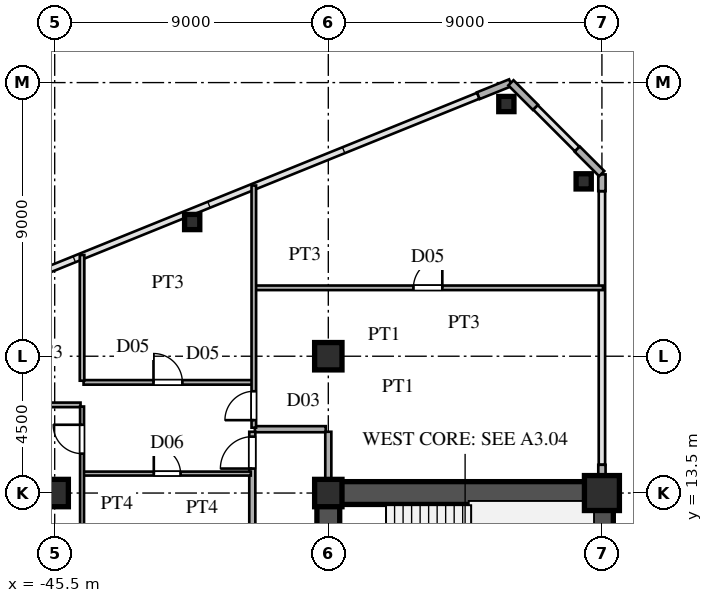
"""IFC4 building model, lengths in metres.
Left out: names, types, materials, properties, quantities, classifications, styles, units other than length and angle.
Written with IfcOpenShell. Run it as: python <this file> out.ifc"""

import sys

from ifc_helpers import new_model, si_unit, direction, frame, frame_2d, origin, origin_2d, place, context, subcontext, project, spatial, rectangle, hollow_rectangle, i_section, extrude, source, transform, mapped, element, fill, save


model = new_model("IFC4")
c1 = context("Model", 3, precision=1e-05, world=origin(), true_north=direction((0.0, 1.0)))
c2 = subcontext(c1, "Body", "Model", "MODEL_VIEW")
j1 = project(units=[si_unit("LENGTHUNIT", "METRE"), si_unit("PLANEANGLEUNIT", "RADIAN")], contexts=[c1])
p1 = place(None, origin())
s1 = spatial("IfcSite", under=j1, at=p1, CompositionType="ELEMENT")
p2 = place(p1, origin())
s2 = spatial("IfcBuilding", under=s1, at=p2, CompositionType="ELEMENT")
p3 = place(p2, frame((0.0, 0.0, 40.5)))
s3 = spatial("IfcBuildingStorey", under=s2, at=p3, CompositionType="ELEMENT", Elevation=40.5)
m1 = source(origin(), c2, "Body", "SweptSolid", [
    extrude(hollow_rectangle(XDim=1.15, YDim=1.15, WallThickness=0.048, at=origin_2d()), origin(), (0.0, 0.0, 1.0), 3.6),
])
p4 = place(p3, frame((-27.5, 13.5, 0.0), z_axis=(0.0, 0.0, 1.0), x_axis=(1.0, 0.0, 0.0)))
e1 = element("IfcColumn", 1, at=p4, inside=s3, PredefinedType="COLUMN", context=c2, shape_type="MappedRepresentation", body=[
    mapped(m1, transform((0.0, 0.0, 0.0), scale=1.0)),
])
m2 = source(origin(), c2, "Body", "SweptSolid", [
    extrude(i_section(OverallWidth=0.9, OverallDepth=0.9, WebThickness=0.036, FlangeThickness=0.055, at=origin_2d()), origin(), (0.0, 0.0, 1.0), 3.6),
])
for number, where, z_axis, x_axis in (
    (2, (-36.5, 13.5, 0.0), (0.0, 0.0, 1.0), (1.0, 0.0, 0.0)),
    (3, (-36.5, 18.0, 0.0), (0.0, 0.0, 1.0), (1.0, 0.0, 0.0)),
    (4, (-45.5, 13.5, 0.0), (0.0, 0.0, 1.0), (1.0, 0.0, 0.0)),
):
    element("IfcColumn", number, at=place(p3, frame(where, z_axis=z_axis, x_axis=x_axis)), inside=s3, PredefinedType="COLUMN", context=c2, shape_type="MappedRepresentation", body=[
        mapped(m2, transform((0.0, 0.0, 0.0), scale=1.0)),
    ])
m3 = source(origin(), c2, "Body", "SweptSolid", [
    extrude(hollow_rectangle(XDim=0.5, YDim=0.5, WallThickness=0.02, at=origin_2d()), origin(), (0.0, 0.0, 1.0), 3.6),
])
for number, where, z_axis, x_axis in (
    (5, (-28.1, 23.751, 0.0), (0.0, 0.0, 1.0), (1.0, 0.0, 0.0)),
    (6, (-30.643, 26.295, 0.0), (0.0, 0.0, 1.0), (1.0, 0.0, 0.0)),
    (7, (-40.977, 22.414, 0.0), (0.0, 0.0, 1.0), (1.0, 0.0, 0.0)),
):
    element("IfcColumn", number, at=place(p3, frame(where, z_axis=z_axis, x_axis=x_axis)), inside=s3, PredefinedType="COLUMN", context=c2, shape_type="MappedRepresentation", body=[
        mapped(m3, transform((0.0, 0.0, 0.0), scale=1.0)),
    ])
p5 = place(p3, frame((-27.5, 13.88, 0.0), z_axis=(0.0, 0.0, 1.0), x_axis=(0.0, 1.0, 0.0)))
e8 = element("IfcWall", 8, at=p5, inside=s3, PredefinedType="SOLIDWALL", context=c2, shape_type="SweptSolid", body=[
    extrude(rectangle(XDim=0.55, YDim=0.24, at=frame_2d((0.275, 0.0))), origin(), (0.0, 0.0, 1.0), 2.88),
])
p6 = place(p3, frame((-27.5, 23.43, 0.0), z_axis=(0.0, 0.0, 1.0), x_axis=(0.0, 1.0, 0.0)))
e9 = element("IfcWall", 9, at=p6, inside=s3, PredefinedType="SOLIDWALL", context=c2, shape_type="SweptSolid", body=[
    extrude(rectangle(XDim=0.55, YDim=0.24, at=frame_2d((0.275, 0.0))), origin(), (0.0, 0.0, 1.0), 3.38),
])
for number, where, z_axis, x_axis in (
    (10, (-27.507, 24.007, 0.0), (0.0, 0.0, 1.0), (-0.707, 0.707, 0.0)),
    (11, (-29.687, 26.187, 0.0), (0.0, 0.0, 1.0), (-0.707, 0.707, 0.0)),
):
    element("IfcWall", number, at=place(p3, frame(where, z_axis=z_axis, x_axis=x_axis)), inside=s3, PredefinedType="SOLIDWALL", context=c2, shape_type="SweptSolid", body=[
        extrude(rectangle(XDim=1.14, YDim=0.24, at=frame_2d((0.57, 0.0))), origin(), (0.0, 0.0, 1.0), 3.38),
    ])
p7 = place(p3, frame((-30.509, 26.996, 0.0), z_axis=(0.0, 0.0, 1.0), x_axis=(-0.927007103665, -0.375043770452, 0.0)))
e12 = element("IfcWall", 12, at=p7, inside=s3, PredefinedType="SOLIDWALL", context=c2, shape_type="SweptSolid", body=[
    extrude(rectangle(XDim=1.14, YDim=0.24, at=frame_2d((0.57, 0.0))), origin(), (0.0, 0.0, 1.0), 3.38),
])
p8 = place(p3, frame((-27.5, 1.3, 0.0), z_axis=(0.0, 0.0, 1.0), x_axis=(0.0, 1.0, 0.0)))
e13 = element("IfcWall", 13, at=p8, inside=s3, PredefinedType="SHEAR", context=c2, shape_type="SweptSolid", body=[
    extrude(rectangle(XDim=12.2, YDim=0.75, at=frame_2d((6.1, 0.0))), origin(), (0.0, 0.0, 1.0), 3.38),
])
p9 = place(p3, frame((-36.5, 13.5, 0.0), z_axis=(0.0, 0.0, 1.0), x_axis=(1.0, 0.0, 0.0)))
e14 = element("IfcWall", 14, at=p9, inside=s3, PredefinedType="SHEAR", context=c2, shape_type="SweptSolid", body=[
    extrude(rectangle(XDim=9.0, YDim=0.75, at=frame_2d((4.5, 0.0))), origin(), (0.0, 0.0, 1.0), 3.38),
])
p10 = place(p3, frame((-36.5, 8.2, 0.0), z_axis=(0.0, 0.0, 1.0), x_axis=(0.0, 1.0, 0.0)))
e15 = element("IfcWall", 15, at=p10, inside=s3, PredefinedType="SHEAR", context=c2, shape_type="SweptSolid", body=[
    extrude(rectangle(XDim=5.45, YDim=0.75, at=frame_2d((2.725, 0.0))), origin(), (0.0, 0.0, 1.0), 3.38),
])
p11 = place(p10, frame((0.245, 0.0, 0.0)))
e16 = element("IfcOpeningElement", 16, at=p11, cuts=e15, PredefinedType="OPENING", context=c2, shape_type="SweptSolid", body=[
    extrude(rectangle(XDim=0.95, YDim=2.15, at=frame_2d((0.475, 1.075))), frame((0.0, 0.385, 0.0), z_axis=(0.0, -1.0, 0.0), x_axis=(1.0, 0.0, 0.0)), (0.0, 0.0, 1.0), 0.77),
])
p12 = place(p3, frame((-44.55, 14.14, 0.0), z_axis=(0.0, 0.0, 1.0), x_axis=(1.0, 0.0, 0.0)))
e17 = element("IfcWall", 17, at=p12, inside=s3, PredefinedType="PARTITIONING", context=c2, shape_type="SweptSolid", body=[
    extrude(rectangle(XDim=5.5, YDim=0.13, at=frame_2d((2.75, 0.0))), origin(), (0.0, 0.0, 1.0), 3.38),
])
p13 = place(p12, frame((2.31, 0.0, 0.0)))
e18 = element("IfcOpeningElement", 18, at=p13, cuts=e17, PredefinedType="OPENING", context=c2, shape_type="SweptSolid", body=[
    extrude(rectangle(XDim=0.88, YDim=2.1, at=frame_2d((0.44, 1.05))), frame((0.0, 0.075, 0.0), z_axis=(0.0, -1.0, 0.0), x_axis=(1.0, 0.0, 0.0)), (0.0, 0.0, 1.0), 0.15),
])
p14 = place(p3, frame((-38.915, 15.6, 0.0), z_axis=(0.0, 0.0, 1.0), x_axis=(1.0, 0.0, 0.0)))
e19 = element("IfcWall", 19, at=p14, inside=s3, PredefinedType="PARTITIONING", context=c2, shape_type="SweptSolid", body=[
    extrude(rectangle(XDim=2.33, YDim=0.2, at=frame_2d((1.165, 0.0))), origin(), (0.0, 0.0, 1.0), 3.38),
])
p15 = place(p3, frame((-54.45, 16.4, 0.0), z_axis=(0.0, 0.0, 1.0), x_axis=(1.0, 0.0, 0.0)))
e20 = element("IfcWall", 20, at=p15, inside=s3, PredefinedType="PARTITIONING", context=c2, shape_type="SweptSolid", body=[
    extrude(rectangle(XDim=9.8, YDim=0.15, at=frame_2d((4.9, 0.0))), origin(), (0.0, 0.0, 1.0), 3.38),
])
p16 = place(p15, frame((4.425, 0.0, 0.0)))
e21 = element("IfcOpeningElement", 21, at=p16, cuts=e20, PredefinedType="OPENING", context=c2, shape_type="SweptSolid", body=[
    extrude(rectangle(XDim=0.95, YDim=2.15, at=frame_2d((0.475, 1.075))), frame((0.0, 0.085, 0.0), z_axis=(0.0, -1.0, 0.0), x_axis=(1.0, 0.0, 0.0)), (0.0, 0.0, 1.0), 0.17),
])
p17 = place(p3, frame((-44.55, 17.14, 0.0), z_axis=(0.0, 0.0, 1.0), x_axis=(1.0, 0.0, 0.0)))
e22 = element("IfcWall", 22, at=p17, inside=s3, PredefinedType="PARTITIONING", context=c2, shape_type="SweptSolid", body=[
    extrude(rectangle(XDim=5.55, YDim=0.15, at=frame_2d((2.775, 0.0))), origin(), (0.0, 0.0, 1.0), 3.38),
])
p18 = place(p17, frame((2.3, 0.0, 0.0)))
e23 = element("IfcOpeningElement", 23, at=p18, cuts=e22, PredefinedType="OPENING", context=c2, shape_type="SweptSolid", body=[
    extrude(rectangle(XDim=0.95, YDim=2.15, at=frame_2d((0.475, 1.075))), frame((0.0, 0.085, 0.0), z_axis=(0.0, -1.0, 0.0), x_axis=(1.0, 0.0, 0.0)), (0.0, 0.0, 1.0), 0.17),
])
p19 = place(p3, frame((-38.9, 20.25, 0.0), z_axis=(0.0, 0.0, 1.0), x_axis=(1.0, 0.0, 0.0)))
e24 = element("IfcWall", 24, at=p19, inside=s3, PredefinedType="PARTITIONING", context=c2, shape_type="SweptSolid", body=[
    extrude(rectangle(XDim=11.435, YDim=0.15, at=frame_2d((5.717, 0.0))), origin(), (0.0, 0.0, 1.0), 3.38),
])
p20 = place(p19, frame((5.2, 0.0, 0.0)))
e25 = element("IfcOpeningElement", 25, at=p20, cuts=e24, PredefinedType="OPENING", context=c2, shape_type="SweptSolid", body=[
    extrude(rectangle(XDim=0.95, YDim=2.15, at=frame_2d((0.475, 1.075))), frame((0.0, 0.085, 0.0), z_axis=(0.0, -1.0, 0.0), x_axis=(1.0, 0.0, 0.0)), (0.0, 0.0, 1.0), 0.17),
])
p21 = place(p3, frame((-44.6, 7.652, 0.0), z_axis=(0.0, 0.0, 1.0), x_axis=(0.0, 1.0, 0.0)))
e26 = element("IfcWall", 26, at=p21, inside=s3, PredefinedType="PARTITIONING", context=c2, shape_type="SweptSolid", body=[
    extrude(rectangle(XDim=8.694, YDim=0.13, at=frame_2d((4.347, 0.0))), origin(), (0.0, 0.0, 1.0), 3.38),
])
p22 = place(p21, frame((7.144, 0.0, 0.0)))
e27 = element("IfcOpeningElement", 27, at=p22, cuts=e26, PredefinedType="OPENING", context=c2, shape_type="SweptSolid", body=[
    extrude(rectangle(XDim=0.95, YDim=2.15, at=frame_2d((0.475, 1.075))), frame((0.0, 0.075, 0.0), z_axis=(0.0, -1.0, 0.0), x_axis=(1.0, 0.0, 0.0)), (0.0, 0.0, 1.0), 0.15),
])
p23 = place(p3, frame((-44.6, 17.195, 0.0), z_axis=(0.0, 0.0, 1.0), x_axis=(0.0, 1.0, 0.0)))
e28 = element("IfcWall", 28, at=p23, inside=s3, PredefinedType="PARTITIONING", context=c2, shape_type="SweptSolid", body=[
    extrude(rectangle(XDim=4.133, YDim=0.15, at=frame_2d((2.066, 0.0))), origin(), (0.0, 0.0, 1.0), 3.38),
])
p24 = place(p3, frame((-39.0, -15.515, 0.0), z_axis=(0.0, 0.0, 1.0), x_axis=(0.0, 1.0, 0.0)))
e29 = element("IfcWall", 29, at=p24, inside=s3, PredefinedType="PARTITIONING", context=c2, shape_type="SweptSolid", body=[
    extrude(rectangle(XDim=31.03, YDim=0.2, at=frame_2d((15.515, 0.0))), origin(), (0.0, 0.0, 1.0), 3.38),
])
p25 = place(p24, frame((0.367, 0.0, 0.0)))
e30 = element("IfcOpeningElement", 30, at=p25, cuts=e29, PredefinedType="OPENING", context=c2, shape_type="SweptSolid", body=[
    extrude(rectangle(XDim=1.05, YDim=2.25, at=frame_2d((0.525, 1.125))), frame((0.0, 0.11, 0.0), z_axis=(0.0, -1.0, 0.0), x_axis=(1.0, 0.0, 0.0)), (0.0, 0.0, 1.0), 0.22),
])
p26 = place(p24, frame((8.638, 0.0, 0.0)))
e31 = element("IfcOpeningElement", 31, at=p26, cuts=e29, PredefinedType="OPENING", context=c2, shape_type="SweptSolid", body=[
    extrude(rectangle(XDim=1.05, YDim=2.25, at=frame_2d((0.525, 1.125))), frame((0.0, 0.11, 0.0), z_axis=(0.0, -1.0, 0.0), x_axis=(1.0, 0.0, 0.0)), (0.0, 0.0, 1.0), 0.22),
])
p27 = place(p24, frame((19.795, 0.0, 0.0)))
e32 = element("IfcOpeningElement", 32, at=p27, cuts=e29, PredefinedType="OPENING", context=c2, shape_type="SweptSolid", body=[
    extrude(rectangle(XDim=1.05, YDim=2.25, at=frame_2d((0.525, 1.125))), frame((0.0, 0.11, 0.0), z_axis=(0.0, -1.0, 0.0), x_axis=(1.0, 0.0, 0.0)), (0.0, 0.0, 1.0), 0.22),
])
p28 = place(p24, frame((29.82, 0.0, 0.0)))
e33 = element("IfcOpeningElement", 33, at=p28, cuts=e29, PredefinedType="OPENING", context=c2, shape_type="SweptSolid", body=[
    extrude(rectangle(XDim=1.05, YDim=2.25, at=frame_2d((0.525, 1.125))), frame((0.0, 0.11, 0.0), z_axis=(0.0, -1.0, 0.0), x_axis=(1.0, 0.0, 0.0)), (0.0, 0.0, 1.0), 0.22),
])
p29 = place(p3, frame((-38.95, 15.65, 0.0), z_axis=(0.0, 0.0, 1.0), x_axis=(0.0, 1.0, 0.0)))
e34 = element("IfcWall", 34, at=p29, inside=s3, PredefinedType="PARTITIONING", context=c2, shape_type="SweptSolid", body=[
    extrude(rectangle(XDim=7.965, YDim=0.15, at=frame_2d((3.982, 0.0))), origin(), (0.0, 0.0, 1.0), 3.38),
])
p30 = place(p29, frame((0.248, 0.0, 0.0)))
e35 = element("IfcOpeningElement", 35, at=p30, cuts=e34, PredefinedType="OPENING", context=c2, shape_type="SweptSolid", body=[
    extrude(rectangle(XDim=0.95, YDim=2.15, at=frame_2d((0.475, 1.075))), frame((0.0, 0.085, 0.0), z_axis=(0.0, -1.0, 0.0), x_axis=(1.0, 0.0, 0.0)), (0.0, 0.0, 1.0), 0.17),
])
p31 = place(p3, frame((-36.5, 13.88, 0.0), z_axis=(0.0, 0.0, 1.0), x_axis=(0.0, 1.0, 0.0)))
e36 = element("IfcWall", 36, at=p31, inside=s3, PredefinedType="PARTITIONING", context=c2, shape_type="SweptSolid", body=[
    extrude(rectangle(XDim=1.635, YDim=0.2, at=frame_2d((0.817, 0.0))), origin(), (0.0, 0.0, 1.0), 2.68),
])
m4 = source(origin(), c2, "Body", "SweptSolid", [
    extrude(rectangle(XDim=0.88, YDim=2.1, at=frame_2d((0.44, 1.05))), frame((0.0, 0.025, 0.0), z_axis=(0.0, -1.0, 0.0), x_axis=(1.0, 0.0, 0.0)), (0.0, 0.0, 1.0), 0.05),
])
p32 = place(p13, origin())
e37 = element("IfcDoor", 37, at=p32, inside=s3, OperationType="SINGLE_SWING_LEFT", PredefinedType="DOOR", context=c2, shape_type="MappedRepresentation", body=[
    mapped(m4, transform((0.0, 0.0, 0.0), scale=1.0)),
])
fill(e18, e37)
m5 = source(origin(), c2, "Body", "SweptSolid", [
    extrude(rectangle(XDim=0.95, YDim=2.15, at=frame_2d((0.475, 1.075))), frame((0.0, 0.025, 0.0), z_axis=(0.0, -1.0, 0.0), x_axis=(1.0, 0.0, 0.0)), (0.0, 0.0, 1.0), 0.05),
])
p33 = place(p18, origin())
e38 = element("IfcDoor", 38, at=p33, inside=s3, OperationType="SINGLE_SWING_LEFT", PredefinedType="DOOR", context=c2, shape_type="MappedRepresentation", body=[
    mapped(m5, transform((0.0, 0.0, 0.0), scale=1.0)),
])
fill(e23, e38)
p34 = place(p20, origin())
e39 = element("IfcDoor", 39, at=p34, inside=s3, OperationType="SINGLE_SWING_RIGHT", PredefinedType="DOOR", context=c2, shape_type="MappedRepresentation", body=[
    mapped(m5, transform((0.0, 0.0, 0.0), scale=1.0)),
])
fill(e25, e39)
p35 = place(p22, origin())
e40 = element("IfcDoor", 40, at=p35, inside=s3, OperationType="SINGLE_SWING_RIGHT", PredefinedType="DOOR", context=c2, shape_type="MappedRepresentation", body=[
    mapped(m5, transform((0.0, 0.0, 0.0), scale=1.0)),
])
fill(e27, e40)
m6 = source(origin(), c2, "Body", "SweptSolid", [
    extrude(rectangle(XDim=1.05, YDim=2.25, at=frame_2d((0.525, 1.125))), frame((0.0, 0.025, 0.0), z_axis=(0.0, -1.0, 0.0), x_axis=(1.0, 0.0, 0.0)), (0.0, 0.0, 1.0), 0.05),
])
p36 = place(p28, origin())
e41 = element("IfcDoor", 41, at=p36, inside=s3, OperationType="SINGLE_SWING_LEFT", PredefinedType="DOOR", context=c2, shape_type="MappedRepresentation", body=[
    mapped(m6, transform((0.0, 0.0, 0.0), scale=1.0)),
])
fill(e33, e41)
p37 = place(p30, origin())
e42 = element("IfcDoor", 42, at=p37, inside=s3, OperationType="SINGLE_SWING_LEFT", PredefinedType="DOOR", context=c2, shape_type="MappedRepresentation", body=[
    mapped(m5, transform((0.0, 0.0, 0.0), scale=1.0)),
])
fill(e35, e42)
save(model, sys.argv[1])
